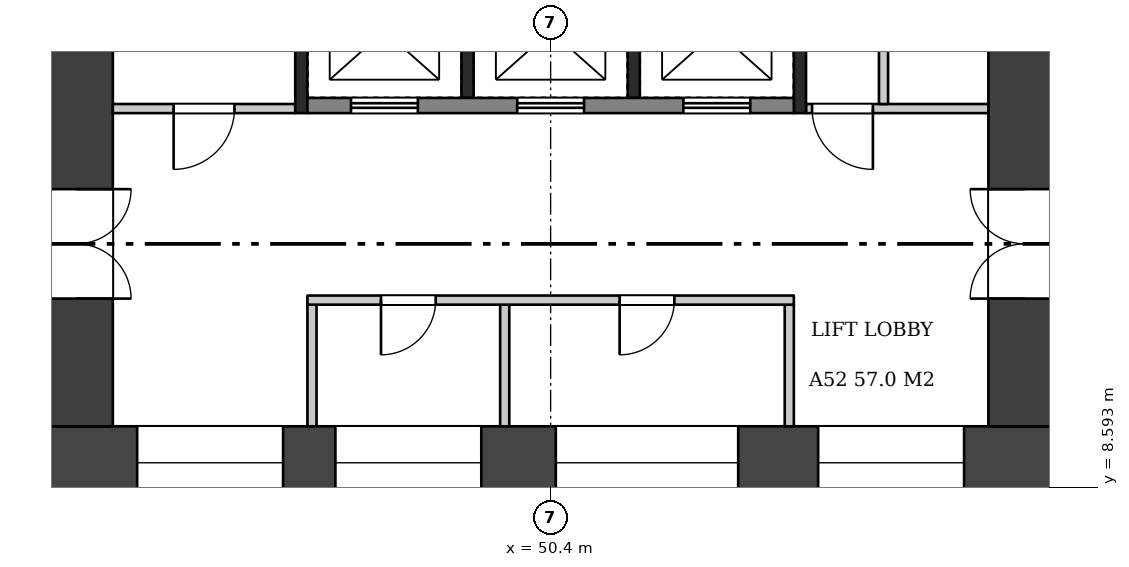
"""IFC4 building model, lengths in metres.
Left out: names, types, materials, properties, quantities, classifications, styles, units other than length and angle.
Written with IfcOpenShell. Run it as: python <this file> out.ifc"""

import sys

from ifc_helpers import new_model, si_unit, direction, frame, frame_2d, origin, place, context, subcontext, project, spatial, rectangle, extrude, element, fill, save


model = new_model("IFC4")
c1 = context("Model", 3, precision=1e-05, world=origin(), true_north=direction((0.0, 1.0)))
c2 = subcontext(c1, "Body", "Model", "MODEL_VIEW")
j1 = project(units=[si_unit("LENGTHUNIT", "METRE"), si_unit("PLANEANGLEUNIT", "RADIAN")], contexts=[c1])
p1 = place(None, origin())
s1 = spatial("IfcSite", under=j1, at=p1, CompositionType="ELEMENT")
p2 = place(p1, origin())
s2 = spatial("IfcBuilding", under=s1, at=p2, CompositionType="ELEMENT")
p3 = place(p2, frame((0.0, 0.0, 200.2)))
s3 = spatial("IfcBuildingStorey", under=s2, at=p3, CompositionType="ELEMENT", Elevation=200.2)
p4 = place(p3, frame((42.0, 9.0, 0.0), z_axis=(0.0, 0.0, 1.0), x_axis=(1.0, 0.0, 0.0)))
e1 = element("IfcWall", 1, at=p4, inside=s3, PredefinedType="SHEAR", context=c2, shape_type="SweptSolid", body=[
    extrude(rectangle(XDim=16.8, YDim=1.2, at=frame_2d((8.4, 0.0))), origin(), (0.0, 0.0, 1.0), 3.22),
])
p5 = place(p4, frame((1.6, 0.0, 0.6)))
e2 = element("IfcOpeningElement", 2, at=p5, cuts=e1, PredefinedType="OPENING", context=c2, shape_type="SweptSolid", body=[
    extrude(rectangle(XDim=2.4, YDim=2.1, at=frame_2d((1.2, 1.05))), frame((0.0, 0.61, 0.0), z_axis=(0.0, -1.0, 0.0), x_axis=(1.0, 0.0, 0.0)), (0.0, 0.0, 1.0), 1.22),
])
p6 = place(p4, frame((4.86, 0.0, 1.6)))
e3 = element("IfcOpeningElement", 3, at=p6, cuts=e1, PredefinedType="OPENING", context=c2, shape_type="SweptSolid", body=[
    extrude(rectangle(XDim=2.4, YDim=1.2, at=frame_2d((1.2, 0.6))), frame((0.0, 0.61, 0.0), z_axis=(0.0, -1.0, 0.0), x_axis=(1.0, 0.0, 0.0)), (0.0, 0.0, 1.0), 1.22),
])
p7 = place(p4, frame((8.485, 0.0, 1.6)))
e4 = element("IfcOpeningElement", 4, at=p7, cuts=e1, PredefinedType="OPENING", context=c2, shape_type="SweptSolid", body=[
    extrude(rectangle(XDim=3.0, YDim=1.2, at=frame_2d((1.5, 0.6))), frame((0.0, 0.61, 0.0), z_axis=(0.0, -1.0, 0.0), x_axis=(1.0, 0.0, 0.0)), (0.0, 0.0, 1.0), 1.22),
])
p8 = place(p4, frame((12.8, 0.0, 0.6)))
e5 = element("IfcOpeningElement", 5, at=p8, cuts=e1, PredefinedType="OPENING", context=c2, shape_type="SweptSolid", body=[
    extrude(rectangle(XDim=2.4, YDim=2.1, at=frame_2d((1.2, 1.05))), frame((0.0, 0.61, 0.0), z_axis=(0.0, -1.0, 0.0), x_axis=(1.0, 0.0, 0.0)), (0.0, 0.0, 1.0), 1.22),
])
p9 = place(p3, frame((42.6, 9.6, 0.0), z_axis=(0.0, 0.0, 1.0), x_axis=(0.0, 1.0, 0.0)))
e6 = element("IfcWall", 6, at=p9, inside=s3, PredefinedType="SHEAR", context=c2, shape_type="SweptSolid", body=[
    extrude(rectangle(XDim=14.4, YDim=1.2, at=frame_2d((7.2, 0.0))), origin(), (0.0, 0.0, 1.0), 3.22),
])
p10 = place(p9, frame((2.1, 0.0, 0.0)))
e7 = element("IfcOpeningElement", 7, at=p10, cuts=e6, PredefinedType="OPENING", context=c2, shape_type="SweptSolid", body=[
    extrude(rectangle(XDim=1.8, YDim=2.1, at=frame_2d((0.9, 1.05))), frame((0.0, 0.61, 0.0), z_axis=(0.0, -1.0, 0.0), x_axis=(1.0, 0.0, 0.0)), (0.0, 0.0, 1.0), 1.22),
])
p11 = place(p3, frame((58.2, 9.6, 0.0), z_axis=(0.0, 0.0, 1.0), x_axis=(0.0, 1.0, 0.0)))
e8 = element("IfcWall", 8, at=p11, inside=s3, PredefinedType="SHEAR", context=c2, shape_type="SweptSolid", body=[
    extrude(rectangle(XDim=14.4, YDim=1.2, at=frame_2d((7.2, 0.0))), origin(), (0.0, 0.0, 1.0), 3.22),
])
p12 = place(p11, frame((2.1, 0.0, 0.0)))
e9 = element("IfcOpeningElement", 9, at=p12, cuts=e8, PredefinedType="OPENING", context=c2, shape_type="SweptSolid", body=[
    extrude(rectangle(XDim=1.8, YDim=2.1, at=frame_2d((0.9, 1.05))), frame((0.0, 0.61, 0.0), z_axis=(0.0, -1.0, 0.0), x_axis=(1.0, 0.0, 0.0)), (0.0, 0.0, 1.0), 1.22),
])
for number, where, z_axis, x_axis in (
    (10, (46.475, 9.6, 0.0), (0.0, 0.0, 1.0), (0.0, 1.0, 0.0)),
    (11, (54.325, 9.6, 0.0), (0.0, 0.0, 1.0), (0.0, 1.0, 0.0)),
    (12, (49.645, 9.6, 0.0), (0.0, 0.0, 1.0), (0.0, 1.0, 0.0)),
):
    element("IfcWall", number, at=place(p3, frame(where, z_axis=z_axis, x_axis=x_axis)), inside=s3, PredefinedType="PARTITIONING", context=c2, shape_type="SweptSolid", body=[
        extrude(rectangle(XDim=2.0, YDim=0.15, at=frame_2d((1.0, 0.0))), origin(), (0.0, 0.0, 1.0), 3.22),
    ])
p13 = place(p3, frame((46.4, 11.675, 0.0), z_axis=(0.0, 0.0, 1.0), x_axis=(1.0, 0.0, 0.0)))
e13 = element("IfcWall", 13, at=p13, inside=s3, PredefinedType="PARTITIONING", context=c2, shape_type="SweptSolid", body=[
    extrude(rectangle(XDim=8.0, YDim=0.15, at=frame_2d((4.0, 0.0))), origin(), (0.0, 0.0, 1.0), 3.22),
])
p14 = place(p13, frame((1.21, 0.0, 0.0)))
e14 = element("IfcOpeningElement", 14, at=p14, cuts=e13, PredefinedType="OPENING", context=c2, shape_type="SweptSolid", body=[
    extrude(rectangle(XDim=0.9, YDim=2.1, at=frame_2d((0.45, 1.05))), frame((0.0, 0.085, 0.0), z_axis=(0.0, -1.0, 0.0), x_axis=(1.0, 0.0, 0.0)), (0.0, 0.0, 1.0), 0.17),
])
p15 = place(p13, frame((5.135, 0.0, 0.0)))
e15 = element("IfcOpeningElement", 15, at=p15, cuts=e13, PredefinedType="OPENING", context=c2, shape_type="SweptSolid", body=[
    extrude(rectangle(XDim=0.9, YDim=2.1, at=frame_2d((0.45, 1.05))), frame((0.0, 0.085, 0.0), z_axis=(0.0, -1.0, 0.0), x_axis=(1.0, 0.0, 0.0)), (0.0, 0.0, 1.0), 0.17),
])
for number, where, z_axis, x_axis in (
    (16, (49.033, 15.0, 0.0), (0.0, 0.0, 1.0), (0.0, 1.0, 0.0)),
    (17, (51.767, 15.0, 0.0), (0.0, 0.0, 1.0), (0.0, 1.0, 0.0)),
):
    element("IfcWall", number, at=place(p3, frame(where, z_axis=z_axis, x_axis=x_axis)), inside=s3, PredefinedType="SHEAR", context=c2, shape_type="SweptSolid", body=[
        extrude(rectangle(XDim=1.9, YDim=0.2, at=frame_2d((0.95, 0.0))), origin(), (0.0, 0.0, 1.0), 3.22),
    ])
p16 = place(p3, frame((46.4, 14.875, 0.0), z_axis=(0.0, 0.0, 1.0), x_axis=(1.0, 0.0, 0.0)))
e18 = element("IfcWall", 18, at=p16, inside=s3, PredefinedType="SHEAR", context=c2, shape_type="SweptSolid", body=[
    extrude(rectangle(XDim=8.0, YDim=0.25, at=frame_2d((4.0, 0.0))), origin(), (0.0, 0.0, 1.0), 3.22),
])
p17 = place(p16, frame((0.717, 0.0, 0.0)))
e19 = element("IfcOpeningElement", 19, at=p17, cuts=e18, PredefinedType="OPENING", context=c2, shape_type="SweptSolid", body=[
    extrude(rectangle(XDim=1.1, YDim=2.1, at=frame_2d((0.55, 1.05))), frame((0.0, 0.135, 0.0), z_axis=(0.0, -1.0, 0.0), x_axis=(1.0, 0.0, 0.0)), (0.0, 0.0, 1.0), 0.27),
])
p18 = place(p16, frame((3.45, 0.0, 0.0)))
e20 = element("IfcOpeningElement", 20, at=p18, cuts=e18, PredefinedType="OPENING", context=c2, shape_type="SweptSolid", body=[
    extrude(rectangle(XDim=1.1, YDim=2.1, at=frame_2d((0.55, 1.05))), frame((0.0, 0.135, 0.0), z_axis=(0.0, -1.0, 0.0), x_axis=(1.0, 0.0, 0.0)), (0.0, 0.0, 1.0), 0.27),
])
p19 = place(p16, frame((6.183, 0.0, 0.0)))
e21 = element("IfcOpeningElement", 21, at=p19, cuts=e18, PredefinedType="OPENING", context=c2, shape_type="SweptSolid", body=[
    extrude(rectangle(XDim=1.1, YDim=2.1, at=frame_2d((0.55, 1.05))), frame((0.0, 0.135, 0.0), z_axis=(0.0, -1.0, 0.0), x_axis=(1.0, 0.0, 0.0)), (0.0, 0.0, 1.0), 0.27),
])
p20 = place(p3, frame((46.3, 14.75, 0.0), z_axis=(0.0, 0.0, 1.0), x_axis=(0.0, 1.0, 0.0)))
e22 = element("IfcWall", 22, at=p20, inside=s3, PredefinedType="SHEAR", context=c2, shape_type="SweptSolid", body=[
    extrude(rectangle(XDim=2.4, YDim=0.2, at=frame_2d((1.2, 0.0))), origin(), (0.0, 0.0, 1.0), 3.22),
])
p21 = place(p3, frame((43.2, 14.825, 0.0), z_axis=(0.0, 0.0, 1.0), x_axis=(1.0, 0.0, 0.0)))
e23 = element("IfcWall", 23, at=p21, inside=s3, PredefinedType="PARTITIONING", context=c2, shape_type="SweptSolid", body=[
    extrude(rectangle(XDim=3.0, YDim=0.15, at=frame_2d((1.5, 0.0))), origin(), (0.0, 0.0, 1.0), 3.22),
])
p22 = place(p21, frame((1.0, 0.0, 0.0)))
e24 = element("IfcOpeningElement", 24, at=p22, cuts=e23, PredefinedType="OPENING", context=c2, shape_type="SweptSolid", body=[
    extrude(rectangle(XDim=1.0, YDim=2.1, at=frame_2d((0.5, 1.05))), frame((0.0, 0.085, 0.0), z_axis=(0.0, -1.0, 0.0), x_axis=(1.0, 0.0, 0.0)), (0.0, 0.0, 1.0), 0.17),
])
p23 = place(p3, frame((54.5, 14.75, 0.0), z_axis=(0.0, 0.0, 1.0), x_axis=(0.0, 1.0, 0.0)))
e25 = element("IfcWall", 25, at=p23, inside=s3, PredefinedType="SHEAR", context=c2, shape_type="SweptSolid", body=[
    extrude(rectangle(XDim=9.25, YDim=0.2, at=frame_2d((4.625, 0.0))), origin(), (0.0, 0.0, 1.0), 3.22),
])
p24 = place(p3, frame((54.6, 14.825, 0.0), z_axis=(0.0, 0.0, 1.0), x_axis=(1.0, 0.0, 0.0)))
e26 = element("IfcWall", 26, at=p24, inside=s3, PredefinedType="PARTITIONING", context=c2, shape_type="SweptSolid", body=[
    extrude(rectangle(XDim=3.0, YDim=0.15, at=frame_2d((1.5, 0.0))), origin(), (0.0, 0.0, 1.0), 3.22),
])
p25 = place(p24, frame((0.1, 0.0, 0.0)))
e27 = element("IfcOpeningElement", 27, at=p25, cuts=e26, PredefinedType="OPENING", context=c2, shape_type="SweptSolid", body=[
    extrude(rectangle(XDim=1.0, YDim=2.1, at=frame_2d((0.5, 1.05))), frame((0.0, 0.085, 0.0), z_axis=(0.0, -1.0, 0.0), x_axis=(1.0, 0.0, 0.0)), (0.0, 0.0, 1.0), 0.17),
])
p26 = place(p3, frame((55.875, 14.9, 0.0), z_axis=(0.0, 0.0, 1.0), x_axis=(0.0, 1.0, 0.0)))
e28 = element("IfcWall", 28, at=p26, inside=s3, PredefinedType="PARTITIONING", context=c2, shape_type="SweptSolid", body=[
    extrude(rectangle(XDim=9.1, YDim=0.15, at=frame_2d((4.55, 0.0))), origin(), (0.0, 0.0, 1.0), 3.22),
])
p27 = place(p26, frame((0.893, 0.0, 0.0)))
e29 = element("IfcOpeningElement", 29, at=p27, cuts=e28, PredefinedType="OPENING", context=c2, shape_type="SweptSolid", body=[
    extrude(rectangle(XDim=0.9, YDim=2.1, at=frame_2d((0.45, 1.05))), frame((0.0, 0.085, 0.0), z_axis=(0.0, -1.0, 0.0), x_axis=(1.0, 0.0, 0.0)), (0.0, 0.0, 1.0), 0.17),
])
p28 = place(p26, frame((5.518, 0.0, 0.0)))
e30 = element("IfcOpeningElement", 30, at=p28, cuts=e28, PredefinedType="OPENING", context=c2, shape_type="SweptSolid", body=[
    extrude(rectangle(XDim=0.9, YDim=2.1, at=frame_2d((0.45, 1.05))), frame((0.0, 0.085, 0.0), z_axis=(0.0, -1.0, 0.0), x_axis=(1.0, 0.0, 0.0)), (0.0, 0.0, 1.0), 0.17),
])
p29 = place(p10, frame((1.8, 0.0, 0.0), z_axis=(0.0, 0.0, 1.0), x_axis=(-1.0, 0.0, 0.0)))
e31 = element("IfcDoor", 31, at=p29, inside=s3, OperationType="DOUBLE_DOOR_SINGLE_SWING", PredefinedType="DOOR", context=c2, shape_type="SweptSolid", body=[
    extrude(rectangle(XDim=1.8, YDim=2.1, at=frame_2d((0.9, 1.05))), frame((0.0, 0.025, 0.0), z_axis=(0.0, -1.0, 0.0), x_axis=(1.0, 0.0, 0.0)), (0.0, 0.0, 1.0), 0.05),
])
fill(e7, e31)
p30 = place(p12, origin())
e32 = element("IfcDoor", 32, at=p30, inside=s3, OperationType="DOUBLE_DOOR_SINGLE_SWING", PredefinedType="DOOR", context=c2, shape_type="SweptSolid", body=[
    extrude(rectangle(XDim=1.8, YDim=2.1, at=frame_2d((0.9, 1.05))), frame((0.0, 0.025, 0.0), z_axis=(0.0, -1.0, 0.0), x_axis=(1.0, 0.0, 0.0)), (0.0, 0.0, 1.0), 0.05),
])
fill(e9, e32)
p31 = place(p14, frame((0.9, 0.0, 0.0), z_axis=(0.0, 0.0, 1.0), x_axis=(-1.0, 0.0, 0.0)))
e33 = element("IfcDoor", 33, at=p31, inside=s3, OperationType="SINGLE_SWING_RIGHT", PredefinedType="DOOR", context=c2, shape_type="SweptSolid", body=[
    extrude(rectangle(XDim=0.9, YDim=2.1, at=frame_2d((0.45, 1.05))), frame((0.0, 0.025, 0.0), z_axis=(0.0, -1.0, 0.0), x_axis=(1.0, 0.0, 0.0)), (0.0, 0.0, 1.0), 0.05),
])
fill(e14, e33)
p32 = place(p15, frame((0.9, 0.0, 0.0), z_axis=(0.0, 0.0, 1.0), x_axis=(-1.0, 0.0, 0.0)))
e34 = element("IfcDoor", 34, at=p32, inside=s3, OperationType="SINGLE_SWING_RIGHT", PredefinedType="DOOR", context=c2, shape_type="SweptSolid", body=[
    extrude(rectangle(XDim=0.9, YDim=2.1, at=frame_2d((0.45, 1.05))), frame((0.0, 0.025, 0.0), z_axis=(0.0, -1.0, 0.0), x_axis=(1.0, 0.0, 0.0)), (0.0, 0.0, 1.0), 0.05),
])
fill(e15, e34)
p33 = place(p17, origin())
e35 = element("IfcDoor", 35, at=p33, inside=s3, OperationType="DOUBLE_DOOR_SLIDING", PredefinedType="DOOR", context=c2, shape_type="SweptSolid", body=[
    extrude(rectangle(XDim=1.1, YDim=2.1, at=frame_2d((0.55, 1.05))), frame((0.0, 0.025, 0.0), z_axis=(0.0, -1.0, 0.0), x_axis=(1.0, 0.0, 0.0)), (0.0, 0.0, 1.0), 0.05),
])
fill(e19, e35)
p34 = place(p18, origin())
e36 = element("IfcDoor", 36, at=p34, inside=s3, OperationType="DOUBLE_DOOR_SLIDING", PredefinedType="DOOR", context=c2, shape_type="SweptSolid", body=[
    extrude(rectangle(XDim=1.1, YDim=2.1, at=frame_2d((0.55, 1.05))), frame((0.0, 0.025, 0.0), z_axis=(0.0, -1.0, 0.0), x_axis=(1.0, 0.0, 0.0)), (0.0, 0.0, 1.0), 0.05),
])
fill(e20, e36)
p35 = place(p19, origin())
e37 = element("IfcDoor", 37, at=p35, inside=s3, OperationType="DOUBLE_DOOR_SLIDING", PredefinedType="DOOR", context=c2, shape_type="SweptSolid", body=[
    extrude(rectangle(XDim=1.1, YDim=2.1, at=frame_2d((0.55, 1.05))), frame((0.0, 0.025, 0.0), z_axis=(0.0, -1.0, 0.0), x_axis=(1.0, 0.0, 0.0)), (0.0, 0.0, 1.0), 0.05),
])
fill(e21, e37)
p36 = place(p22, frame((1.0, 0.0, 0.0), z_axis=(0.0, 0.0, 1.0), x_axis=(-1.0, 0.0, 0.0)))
e38 = element("IfcDoor", 38, at=p36, inside=s3, OperationType="SINGLE_SWING_RIGHT", PredefinedType="DOOR", context=c2, shape_type="SweptSolid", body=[
    extrude(rectangle(XDim=1.0, YDim=2.1, at=frame_2d((0.5, 1.05))), frame((0.0, 0.025, 0.0), z_axis=(0.0, -1.0, 0.0), x_axis=(1.0, 0.0, 0.0)), (0.0, 0.0, 1.0), 0.05),
])
fill(e24, e38)
p37 = place(p25, frame((1.0, 0.0, 0.0), z_axis=(0.0, 0.0, 1.0), x_axis=(-1.0, 0.0, 0.0)))
e39 = element("IfcDoor", 39, at=p37, inside=s3, OperationType="SINGLE_SWING_LEFT", PredefinedType="DOOR", context=c2, shape_type="SweptSolid", body=[
    extrude(rectangle(XDim=1.0, YDim=2.1, at=frame_2d((0.5, 1.05))), frame((0.0, 0.025, 0.0), z_axis=(0.0, -1.0, 0.0), x_axis=(1.0, 0.0, 0.0)), (0.0, 0.0, 1.0), 0.05),
])
fill(e27, e39)
p38 = place(p5, origin())
e40 = element("IfcWindow", 40, at=p38, inside=s3, PartitioningType="SINGLE_PANEL", PredefinedType="WINDOW", context=c2, shape_type="SweptSolid", body=[
    extrude(rectangle(XDim=2.4, YDim=2.1, at=frame_2d((1.2, 1.05))), frame((0.0, 0.03, 0.0), z_axis=(0.0, -1.0, 0.0), x_axis=(1.0, 0.0, 0.0)), (0.0, 0.0, 1.0), 0.06),
])
fill(e2, e40)
p39 = place(p6, origin())
e41 = element("IfcWindow", 41, at=p39, inside=s3, PartitioningType="SINGLE_PANEL", PredefinedType="WINDOW", context=c2, shape_type="SweptSolid", body=[
    extrude(rectangle(XDim=2.4, YDim=1.2, at=frame_2d((1.2, 0.6))), frame((0.0, 0.03, 0.0), z_axis=(0.0, -1.0, 0.0), x_axis=(1.0, 0.0, 0.0)), (0.0, 0.0, 1.0), 0.06),
])
fill(e3, e41)
p40 = place(p7, origin())
e42 = element("IfcWindow", 42, at=p40, inside=s3, PartitioningType="SINGLE_PANEL", PredefinedType="WINDOW", context=c2, shape_type="SweptSolid", body=[
    extrude(rectangle(XDim=3.0, YDim=1.2, at=frame_2d((1.5, 0.6))), frame((0.0, 0.03, 0.0), z_axis=(0.0, -1.0, 0.0), x_axis=(1.0, 0.0, 0.0)), (0.0, 0.0, 1.0), 0.06),
])
fill(e4, e42)
p41 = place(p8, origin())
e43 = element("IfcWindow", 43, at=p41, inside=s3, PartitioningType="SINGLE_PANEL", PredefinedType="WINDOW", context=c2, shape_type="SweptSolid", body=[
    extrude(rectangle(XDim=2.4, YDim=2.1, at=frame_2d((1.2, 1.05))), frame((0.0, 0.03, 0.0), z_axis=(0.0, -1.0, 0.0), x_axis=(1.0, 0.0, 0.0)), (0.0, 0.0, 1.0), 0.06),
])
fill(e5, e43)
save(model, sys.argv[1])
